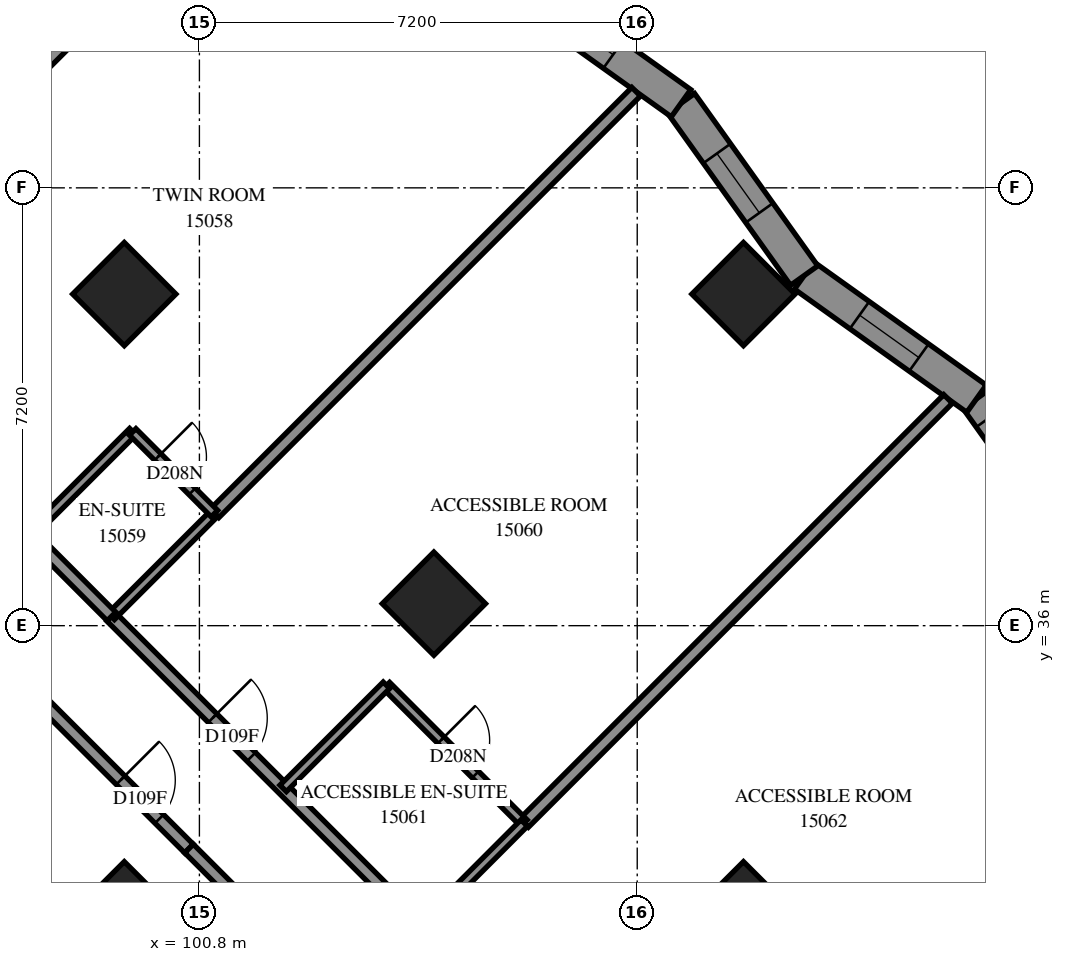
"""IFC4 building model, lengths in metres.
Left out: names, types, materials, properties, quantities, classifications, styles, units other than length and angle.
Written with IfcOpenShell. Run it as: python <this file> out.ifc"""

import sys

from ifc_helpers import new_model, si_unit, direction, frame, frame_2d, origin, origin_2d, place, context, subcontext, project, spatial, polyline, rectangle, outline, extrude, element, fill, save


model = new_model("IFC4")
c1 = context("Model", 3, precision=1e-05, world=origin(), true_north=direction((0.0, 1.0)))
c2 = subcontext(c1, "Body", "Model", "MODEL_VIEW")
j1 = project(units=[si_unit("LENGTHUNIT", "METRE"), si_unit("PLANEANGLEUNIT", "RADIAN")], contexts=[c1])
p1 = place(None, origin())
s1 = spatial("IfcSite", under=j1, at=p1, CompositionType="ELEMENT")
p2 = place(p1, origin())
s2 = spatial("IfcBuilding", under=s1, at=p2, CompositionType="ELEMENT")
p3 = place(p2, frame((0.0, 0.0, 57.6)))
s3 = spatial("IfcBuildingStorey", under=s2, at=p3, CompositionType="ELEMENT", Elevation=57.6)
for number, where, z_axis, x_axis in (
    (1, (99.565, 41.453, 0.0), (0.0, 0.0, 1.0), (0.707, -0.707, 0.0)),
    (2, (109.747, 41.453, 0.0), (0.0, 0.0, 1.0), (0.707, -0.707, 0.0)),
    (3, (104.656, 36.362, 0.0), (0.0, 0.0, 1.0), (0.707, -0.707, 0.0)),
    (4, (99.565, 31.271, 0.0), (0.0, 0.0, 1.0), (0.707, -0.707, 0.0)),
    (5, (109.747, 31.271, 0.0), (0.0, 0.0, 1.0), (0.707, -0.707, 0.0)),
):
    element("IfcColumn", number, at=place(p3, frame(where, z_axis=z_axis, x_axis=x_axis)), inside=s3, PredefinedType="COLUMN", context=c2, shape_type="SweptSolid", body=[
        extrude(rectangle(XDim=1.2, YDim=1.2, at=origin_2d()), origin(), (0.0, 0.0, 1.0), 3.1),
    ])
p4 = place(p3, frame((115.619, 36.879, 0.0), z_axis=(0.0, 0.0, 1.0), x_axis=(-0.5814054054, 0.8136140083, 0.0)))
e6 = element("IfcWall", 6, at=p4, inside=s3, PredefinedType="SOLIDWALL", context=c2, shape_type="SweptSolid", body=[
    extrude(outline(polyline([(0.069, -0.275), (3.553, -0.275), (3.461, 0.275), (-0.069, 0.275), (0.069, -0.275)])), origin(), (0.0, 0.0, 1.0), 3.1),
])
p5 = place(p4, frame((0.331, 0.0, 0.5)))
e7 = element("IfcOpeningElement", 7, at=p5, cuts=e6, PredefinedType="OPENING", context=c2, shape_type="SweptSolid", body=[
    extrude(rectangle(XDim=2.8, YDim=2.45, at=frame_2d((1.4, 1.225))), frame((0.0, 0.285, 0.0), z_axis=(0.0, -1.0, 0.0), x_axis=(1.0, 0.0, 0.0)), (0.0, 0.0, 1.0), 0.57),
])
p6 = place(p3, frame((113.58, 39.732, 0.0), z_axis=(0.0, 0.0, 1.0), x_axis=(-0.8136209625, 0.5813956737, 0.0)))
e8 = element("IfcWall", 8, at=p6, inside=s3, PredefinedType="SOLIDWALL", context=c2, shape_type="SweptSolid", body=[
    extrude(outline(polyline([(-0.046, -0.275), (3.438, -0.275), (3.53, 0.275), (0.046, 0.275), (-0.046, -0.275)])), origin(), (0.0, 0.0, 1.0), 3.1),
])
p7 = place(p6, frame((1.165, 0.0, 0.5)))
e9 = element("IfcOpeningElement", 9, at=p7, cuts=e8, PredefinedType="OPENING", context=c2, shape_type="SweptSolid", body=[
    extrude(rectangle(XDim=1.2, YDim=2.45, at=frame_2d((0.6, 1.225))), frame((0.0, 0.285, 0.0), z_axis=(0.0, -1.0, 0.0), x_axis=(1.0, 0.0, 0.0)), (0.0, 0.0, 1.0), 0.57),
])
p8 = place(p3, frame((110.745, 41.757, 0.0), z_axis=(0.0, 0.0, 1.0), x_axis=(-0.5813956737, 0.8136209625, 0.0)))
e10 = element("IfcWall", 10, at=p8, inside=s3, PredefinedType="SOLIDWALL", context=c2, shape_type="SweptSolid", body=[
    extrude(outline(polyline([(0.046, -0.275), (3.53, -0.275), (3.438, 0.275), (-0.046, 0.275), (0.046, -0.275)])), origin(), (0.0, 0.0, 1.0), 3.1),
])
p9 = place(p8, frame((1.268, 0.0, 0.5)))
e11 = element("IfcOpeningElement", 11, at=p9, cuts=e10, PredefinedType="OPENING", context=c2, shape_type="SweptSolid", body=[
    extrude(rectangle(XDim=1.2, YDim=2.45, at=frame_2d((0.6, 1.225))), frame((0.0, 0.285, 0.0), z_axis=(0.0, -1.0, 0.0), x_axis=(1.0, 0.0, 0.0)), (0.0, 0.0, 1.0), 0.57),
])
p10 = place(p3, frame((108.72, 44.592, 0.0), z_axis=(0.0, 0.0, 1.0), x_axis=(-0.8136209625, 0.5813956737, 0.0)))
e12 = element("IfcWall", 12, at=p10, inside=s3, PredefinedType="SOLIDWALL", context=c2, shape_type="SweptSolid", body=[
    extrude(outline(polyline([(-0.046, -0.275), (3.438, -0.275), (3.53, 0.275), (0.046, 0.275), (-0.046, -0.275)])), origin(), (0.0, 0.0, 1.0), 3.1),
])
p11 = place(p10, frame((1.373, 0.0, 0.5)))
e13 = element("IfcOpeningElement", 13, at=p11, cuts=e12, PredefinedType="OPENING", context=c2, shape_type="SweptSolid", body=[
    extrude(rectangle(XDim=1.2, YDim=2.45, at=frame_2d((0.6, 1.225))), frame((0.0, 0.285, 0.0), z_axis=(0.0, -1.0, 0.0), x_axis=(1.0, 0.0, 0.0)), (0.0, 0.0, 1.0), 0.57),
])
p12 = place(p3, frame((94.259, 41.243, 0.0), z_axis=(0.0, 0.0, 1.0), x_axis=(0.7070203602, 0.7071931916, 0.0)))
e14 = element("IfcWall", 14, at=p12, inside=s3, PredefinedType="PARTITIONING", context=c2, shape_type="SweptSolid", body=[
    extrude(rectangle(XDim=12.151, YDim=0.2, at=frame_2d((6.075, 0.0))), origin(), (0.0, 0.0, 1.0), 3.1),
])
p13 = place(p3, frame((93.484, 42.02, 0.0), z_axis=(0.0, 0.0, 1.0), x_axis=(0.7071067812, 0.7071067812, 0.0)))
e15 = element("IfcWall", 15, at=p13, inside=s3, PredefinedType="PARTITIONING", context=c2, shape_type="SweptSolid", body=[
    extrude(rectangle(XDim=9.998, YDim=0.2, at=frame_2d((4.999, 0.0))), origin(), (0.0, 0.0, 1.0), 3.1),
])
p14 = place(p13, frame((0.148, 0.0, 0.0)))
e16 = element("IfcOpeningElement", 16, at=p14, cuts=e15, PredefinedType="OPENING", context=c2, shape_type="SweptSolid", body=[
    extrude(rectangle(XDim=1.0, YDim=2.1, at=frame_2d((0.5, 1.05))), frame((0.0, 0.11, 0.0), z_axis=(0.0, -1.0, 0.0), x_axis=(1.0, 0.0, 0.0)), (0.0, 0.0, 1.0), 0.22),
])
p15 = place(p3, frame((106.14, 32.756, 0.0), z_axis=(0.0, 0.0, 1.0), x_axis=(0.7071067812, 0.7071067812, 0.0)))
e17 = element("IfcWall", 17, at=p15, inside=s3, PredefinedType="PARTITIONING", context=c2, shape_type="SweptSolid", body=[
    extrude(rectangle(XDim=9.86, YDim=0.2, at=frame_2d((4.93, 0.0))), origin(), (0.0, 0.0, 1.0), 3.1),
])
p16 = place(p3, frame((101.049, 37.847, 0.0), z_axis=(0.0, 0.0, 1.0), x_axis=(0.7071067812, 0.7071067812, 0.0)))
e18 = element("IfcWall", 18, at=p16, inside=s3, PredefinedType="PARTITIONING", context=c2, shape_type="SweptSolid", body=[
    extrude(rectangle(XDim=9.806, YDim=0.2, at=frame_2d((4.903, 0.0))), origin(), (0.0, 0.0, 1.0), 3.1),
])
p17 = place(p3, frame((99.349, 36.147, 0.0), z_axis=(0.0, 0.0, 1.0), x_axis=(0.7071067812, -0.7071067812, 0.0)))
e19 = element("IfcWall", 19, at=p17, inside=s3, PredefinedType="PARTITIONING", context=c2, shape_type="SweptSolid", body=[
    extrude(rectangle(XDim=7.201, YDim=0.2, at=frame_2d((3.601, 0.0))), origin(), (0.0, 0.0, 1.0), 3.1),
])
p18 = place(p17, frame((2.358, 0.0, 0.0)))
e20 = element("IfcOpeningElement", 20, at=p18, cuts=e19, PredefinedType="OPENING", context=c2, shape_type="SweptSolid", body=[
    extrude(rectangle(XDim=0.9, YDim=2.1, at=frame_2d((0.45, 1.05))), frame((0.0, 0.11, 0.0), z_axis=(0.0, -1.0, 0.0), x_axis=(1.0, 0.0, 0.0)), (0.0, 0.0, 1.0), 0.22),
])
p19 = place(p3, frame((98.082, 34.879, 0.0), z_axis=(0.0, 0.0, 1.0), x_axis=(0.7073845681, -0.7068288851, 0.0)))
e21 = element("IfcWall", 21, at=p19, inside=s3, PredefinedType="PARTITIONING", context=c2, shape_type="SweptSolid", body=[
    extrude(rectangle(XDim=3.599, YDim=0.2, at=frame_2d((1.8, 0.0))), origin(), (0.0, 0.0, 1.0), 3.1),
])
p20 = place(p19, frame((2.009, 0.0, 0.0)))
e22 = element("IfcOpeningElement", 22, at=p20, cuts=e21, PredefinedType="OPENING", context=c2, shape_type="SweptSolid", body=[
    extrude(rectangle(XDim=0.9, YDim=2.1, at=frame_2d((0.45, 1.05))), frame((0.0, 0.11, 0.0), z_axis=(0.0, -1.0, 0.0), x_axis=(1.0, 0.0, 0.0)), (0.0, 0.0, 1.0), 0.22),
])
p21 = place(p3, frame((103.875, 35.015, 0.0), z_axis=(0.0, 0.0, 1.0), x_axis=(0.7071067812, -0.7071067812, 0.0)))
e23 = element("IfcWall", 23, at=p21, inside=s3, PredefinedType="PARTITIONING", context=c2, shape_type="SweptSolid", body=[
    extrude(rectangle(XDim=3.199, YDim=0.15, at=frame_2d((1.599, 0.0))), origin(), (0.0, 0.0, 1.0), 3.1),
])
p22 = place(p21, frame((1.27, 0.0, 0.0)))
e24 = element("IfcOpeningElement", 24, at=p22, cuts=e23, PredefinedType="OPENING", context=c2, shape_type="SweptSolid", body=[
    extrude(rectangle(XDim=0.8, YDim=2.1, at=frame_2d((0.4, 1.05))), frame((0.0, 0.085, 0.0), z_axis=(0.0, -1.0, 0.0), x_axis=(1.0, 0.0, 0.0)), (0.0, 0.0, 1.0), 0.17),
])
for number, where, z_axis, x_axis in (
    (25, (99.349, 36.153, 0.0), (0.0, 0.0, 1.0), (0.708, 0.707, 0.0)),
    (26, (104.445, 31.057, 0.0), (0.0, 0.0, 1.0), (0.707, 0.708, 0.0)),
    (27, (102.177, 33.325, 0.0), (0.0, 0.0, 1.0), (0.708, 0.707, 0.0)),
):
    element("IfcWall", number, at=place(p3, frame(where, z_axis=z_axis, x_axis=x_axis)), inside=s3, PredefinedType="PARTITIONING", context=c2, shape_type="SweptSolid", body=[
        extrude(rectangle(XDim=2.4, YDim=0.15, at=frame_2d((1.2, 0.0))), origin(), (0.0, 0.0, 1.0), 3.1),
    ])
p23 = place(p3, frame((98.009, 37.495, 0.0), z_axis=(0.0, 0.0, 1.0), x_axis=(0.7071067812, 0.7071067812, 0.0)))
e28 = element("IfcWall", 28, at=p23, inside=s3, PredefinedType="PARTITIONING", context=c2, shape_type="SweptSolid", body=[
    extrude(rectangle(XDim=2.398, YDim=0.15, at=frame_2d((1.199, 0.0))), origin(), (0.0, 0.0, 1.0), 3.1),
])
p24 = place(p3, frame((99.703, 39.187, 0.0), z_axis=(0.0, 0.0, 1.0), x_axis=(0.7071067812, -0.7071067812, 0.0)))
e29 = element("IfcWall", 29, at=p24, inside=s3, PredefinedType="PARTITIONING", context=c2, shape_type="SweptSolid", body=[
    extrude(rectangle(XDim=1.901, YDim=0.15, at=frame_2d((0.95, 0.0))), origin(), (0.0, 0.0, 1.0), 3.1),
])
p25 = place(p24, frame((0.584, 0.0, 0.0)))
e30 = element("IfcOpeningElement", 30, at=p25, cuts=e29, PredefinedType="OPENING", context=c2, shape_type="SweptSolid", body=[
    extrude(rectangle(XDim=0.8, YDim=2.1, at=frame_2d((0.4, 1.05))), frame((0.0, 0.085, 0.0), z_axis=(0.0, -1.0, 0.0), x_axis=(1.0, 0.0, 0.0)), (0.0, 0.0, 1.0), 0.17),
])
p26 = place(p3, frame((98.012, 37.496, 0.0), z_axis=(0.0, 0.0, 1.0), x_axis=(0.7065800724, -0.7076330979, 0.0)))
e31 = element("IfcWall", 31, at=p26, inside=s3, PredefinedType="PARTITIONING", context=c2, shape_type="SweptSolid", body=[
    extrude(rectangle(XDim=1.899, YDim=0.2, at=frame_2d((0.95, 0.0))), origin(), (0.0, 0.0, 1.0), 3.1),
])
p27 = place(p3, frame((100.629, 32.335, 0.0), z_axis=(0.0, 0.0, 1.0), x_axis=(0.7071067812, -0.7071067812, 0.0)))
e32 = element("IfcWall", 32, at=p27, inside=s3, PredefinedType="PARTITIONING", context=c2, shape_type="SweptSolid", body=[
    extrude(rectangle(XDim=1.7, YDim=0.2, at=frame_2d((0.85, 0.0))), origin(), (0.0, 0.0, 1.0), 3.1),
])
p28 = place(p5, origin())
e33 = element("IfcWindow", 33, at=p28, inside=s3, PartitioningType="SINGLE_PANEL", PredefinedType="WINDOW", context=c2, shape_type="SweptSolid", body=[
    extrude(rectangle(XDim=2.8, YDim=2.45, at=frame_2d((1.4, 1.225))), frame((0.0, 0.155, 0.0), z_axis=(0.0, -1.0, 0.0), x_axis=(1.0, 0.0, 0.0)), (0.0, 0.0, 1.0), 0.06),
])
fill(e7, e33)
p29 = place(p7, origin())
e34 = element("IfcWindow", 34, at=p29, inside=s3, PartitioningType="SINGLE_PANEL", PredefinedType="WINDOW", context=c2, shape_type="SweptSolid", body=[
    extrude(rectangle(XDim=1.2, YDim=2.45, at=frame_2d((0.6, 1.225))), frame((0.0, 0.155, 0.0), z_axis=(0.0, -1.0, 0.0), x_axis=(1.0, 0.0, 0.0)), (0.0, 0.0, 1.0), 0.06),
])
fill(e9, e34)
p30 = place(p9, origin())
e35 = element("IfcWindow", 35, at=p30, inside=s3, PartitioningType="SINGLE_PANEL", PredefinedType="WINDOW", context=c2, shape_type="SweptSolid", body=[
    extrude(rectangle(XDim=1.2, YDim=2.45, at=frame_2d((0.6, 1.225))), frame((0.0, 0.155, 0.0), z_axis=(0.0, -1.0, 0.0), x_axis=(1.0, 0.0, 0.0)), (0.0, 0.0, 1.0), 0.06),
])
fill(e11, e35)
p31 = place(p11, origin())
e36 = element("IfcWindow", 36, at=p31, inside=s3, PartitioningType="SINGLE_PANEL", PredefinedType="WINDOW", context=c2, shape_type="SweptSolid", body=[
    extrude(rectangle(XDim=1.2, YDim=2.45, at=frame_2d((0.6, 1.225))), frame((0.0, 0.155, 0.0), z_axis=(0.0, -1.0, 0.0), x_axis=(1.0, 0.0, 0.0)), (0.0, 0.0, 1.0), 0.06),
])
fill(e13, e36)
p32 = place(p25, origin())
e37 = element("IfcDoor", 37, at=p32, inside=s3, OperationType="SINGLE_SWING_RIGHT", PredefinedType="DOOR", context=c2, shape_type="SweptSolid", body=[
    extrude(rectangle(XDim=0.8, YDim=2.1, at=frame_2d((0.4, 1.05))), frame((0.0, 0.025, 0.0), z_axis=(0.0, -1.0, 0.0), x_axis=(1.0, 0.0, 0.0)), (0.0, 0.0, 1.0), 0.05),
])
fill(e30, e37)
p33 = place(p18, origin())
e38 = element("IfcDoor", 38, at=p33, inside=s3, OperationType="SINGLE_SWING_RIGHT", PredefinedType="DOOR", context=c2, shape_type="SweptSolid", body=[
    extrude(rectangle(XDim=0.9, YDim=2.1, at=frame_2d((0.45, 1.05))), frame((0.0, 0.025, 0.0), z_axis=(0.0, -1.0, 0.0), x_axis=(1.0, 0.0, 0.0)), (0.0, 0.0, 1.0), 0.05),
])
fill(e20, e38)
p34 = place(p22, origin())
e39 = element("IfcDoor", 39, at=p34, inside=s3, OperationType="SINGLE_SWING_RIGHT", PredefinedType="DOOR", context=c2, shape_type="SweptSolid", body=[
    extrude(rectangle(XDim=0.8, YDim=2.1, at=frame_2d((0.4, 1.05))), frame((0.0, 0.025, 0.0), z_axis=(0.0, -1.0, 0.0), x_axis=(1.0, 0.0, 0.0)), (0.0, 0.0, 1.0), 0.05),
])
fill(e24, e39)
p35 = place(p20, origin())
e40 = element("IfcDoor", 40, at=p35, inside=s3, OperationType="SINGLE_SWING_LEFT", PredefinedType="DOOR", context=c2, shape_type="SweptSolid", body=[
    extrude(rectangle(XDim=0.9, YDim=2.1, at=frame_2d((0.45, 1.05))), frame((0.0, 0.025, 0.0), z_axis=(0.0, -1.0, 0.0), x_axis=(1.0, 0.0, 0.0)), (0.0, 0.0, 1.0), 0.05),
])
fill(e22, e40)
save(model, sys.argv[1])
